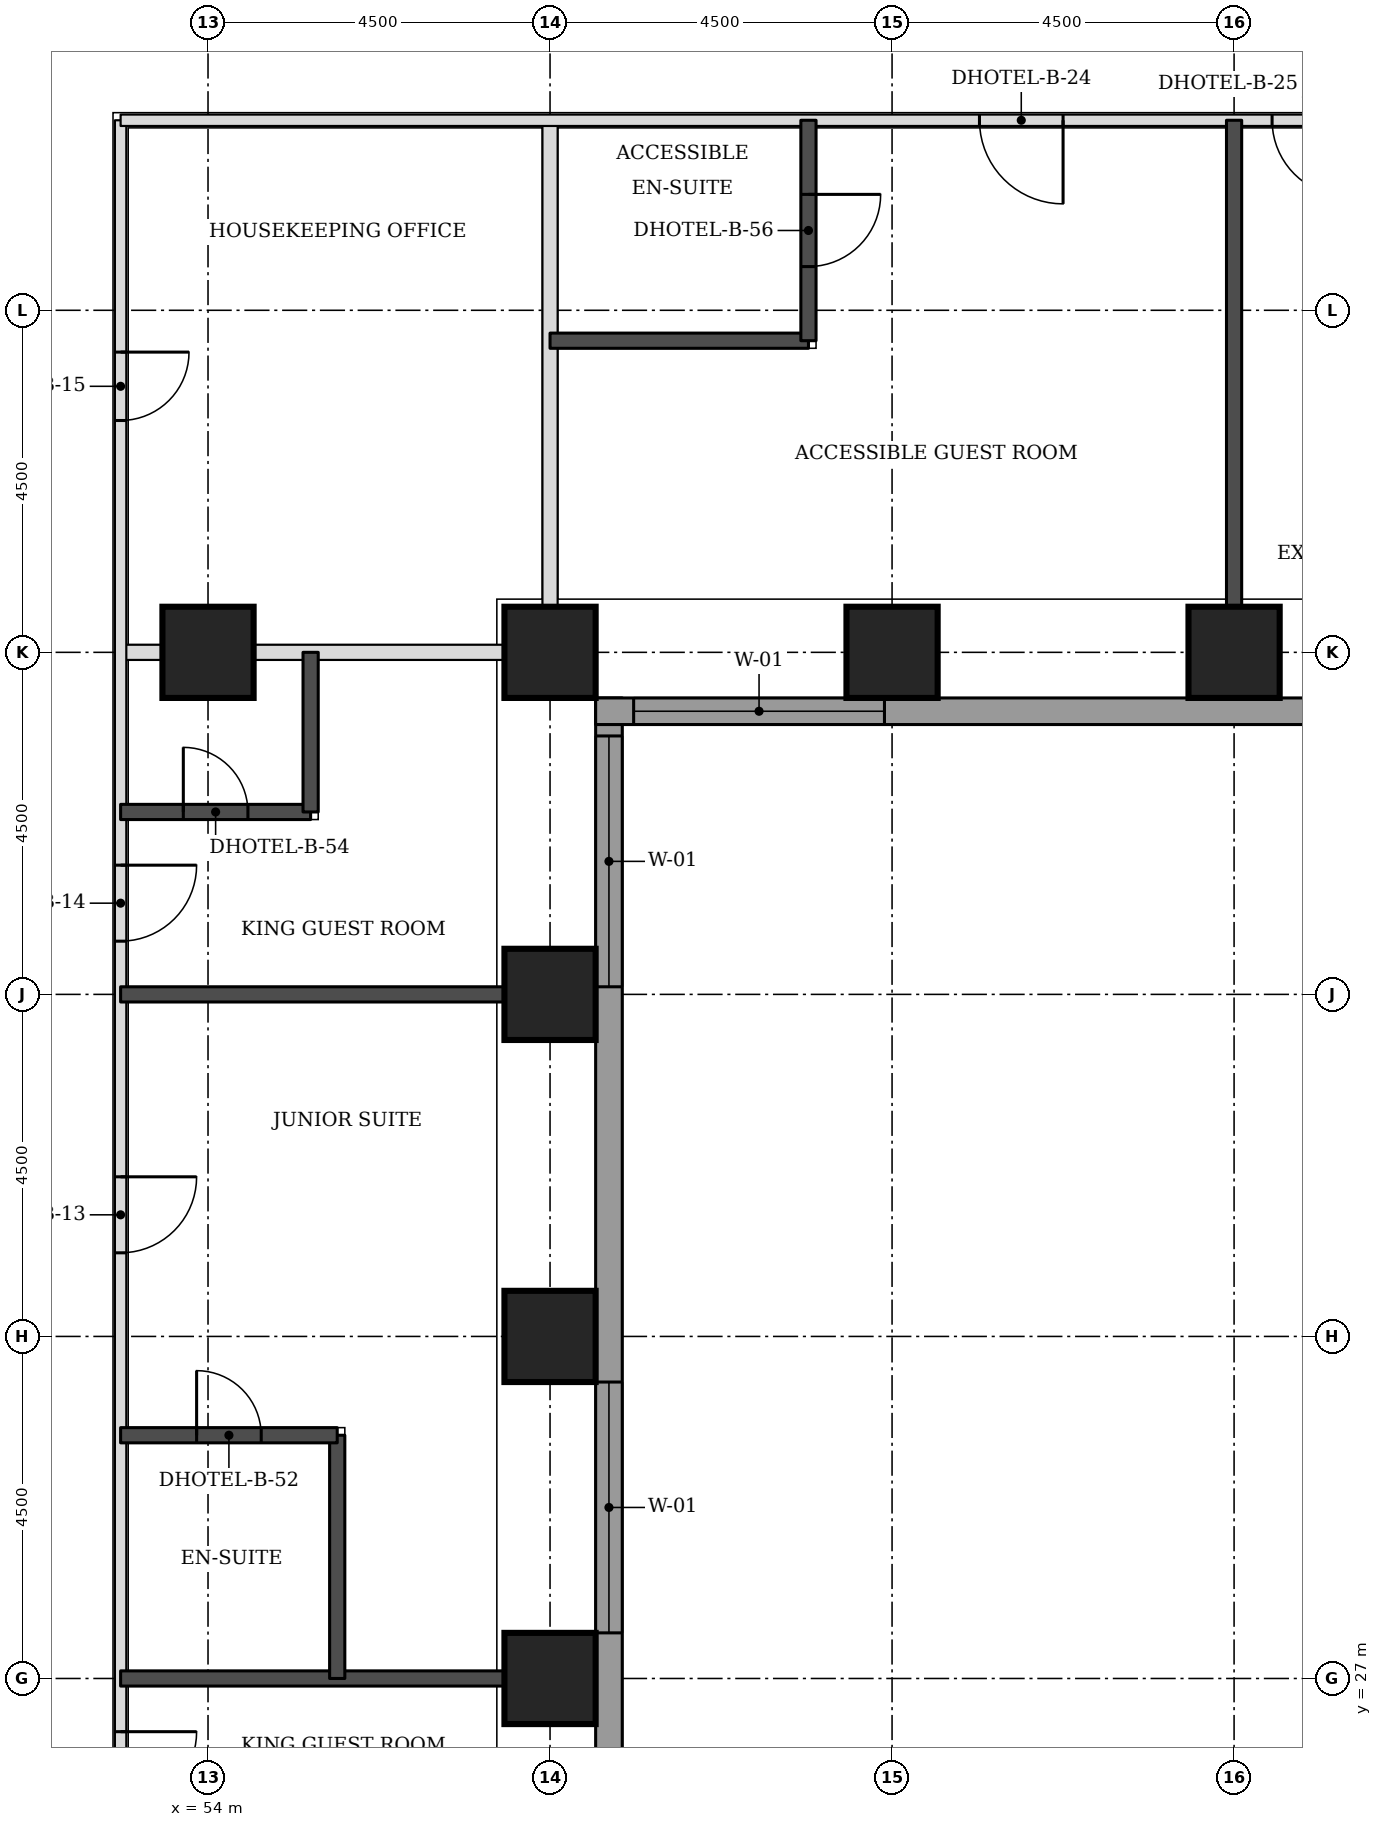
"""IFC4 building model, lengths in metres.
Left out: names, types, materials, properties, quantities, classifications, styles, units other than length and angle.
Written with IfcOpenShell. Run it as: python <this file> out.ifc"""

import sys

from ifc_helpers import new_model, si_unit, direction, frame, frame_2d, origin, origin_2d, place, context, subcontext, project, spatial, rectangle, extrude, element, fill, save


model = new_model("IFC4")
c1 = context("Model", 3, precision=1e-05, world=origin(), true_north=direction((0.0, 1.0)))
c2 = subcontext(c1, "Body", "Model", "MODEL_VIEW")
j1 = project(units=[si_unit("LENGTHUNIT", "METRE"), si_unit("PLANEANGLEUNIT", "RADIAN")], contexts=[c1])
p1 = place(None, origin())
s1 = spatial("IfcSite", under=j1, at=p1, CompositionType="ELEMENT")
p2 = place(p1, origin())
s2 = spatial("IfcBuilding", under=s1, at=p2, CompositionType="ELEMENT")
p3 = place(p2, frame((0.0, 0.0, 29.7)))
s3 = spatial("IfcBuildingStorey", under=s2, at=p3, CompositionType="ELEMENT", Elevation=29.7)
for number, where, z_axis, x_axis in (
    (1, (58.5, 27.0, 0.0), (0.0, 0.0, 1.0), (1.0, 0.0, 0.0)),
    (2, (58.5, 31.5, 0.0), (0.0, 0.0, 1.0), (1.0, 0.0, 0.0)),
    (3, (58.5, 36.0, 0.0), (0.0, 0.0, 1.0), (1.0, 0.0, 0.0)),
    (4, (54.0, 40.5, 0.0), (0.0, 0.0, 1.0), (1.0, 0.0, 0.0)),
    (5, (58.5, 40.5, 0.0), (0.0, 0.0, 1.0), (1.0, 0.0, 0.0)),
    (6, (63.0, 40.5, 0.0), (0.0, 0.0, 1.0), (1.0, 0.0, 0.0)),
    (7, (67.5, 40.5, 0.0), (0.0, 0.0, 1.0), (1.0, 0.0, 0.0)),
):
    element("IfcColumn", number, at=place(p3, frame(where, z_axis=z_axis, x_axis=x_axis)), inside=s3, PredefinedType="COLUMN", context=c2, shape_type="SweptSolid", body=[
        extrude(rectangle(XDim=1.2, YDim=1.2, at=origin_2d()), origin(), (0.0, 0.0, 1.0), 3.3),
    ])
p4 = place(p3, frame((59.275, 22.106, 0.0), z_axis=(0.0, 0.0, 1.0), x_axis=(0.0, 1.0, 0.0)))
e8 = element("IfcWall", 8, at=p4, inside=s3, PredefinedType="STANDARD", context=c2, shape_type="SweptSolid", body=[
    extrude(rectangle(XDim=17.793, YDim=0.35, at=frame_2d((8.897, 0.0))), origin(), (0.0, 0.0, 1.0), 3.055),
])
p5 = place(p4, frame((5.493, 0.0, 0.8)))
e9 = element("IfcOpeningElement", 9, at=p5, cuts=e8, PredefinedType="OPENING", context=c2, shape_type="SweptSolid", body=[
    extrude(rectangle(XDim=3.3, YDim=1.5, at=frame_2d((1.65, 0.75))), frame((0.0, 0.185, 0.0), z_axis=(0.0, -1.0, 0.0), x_axis=(1.0, 0.0, 0.0)), (0.0, 0.0, 1.0), 0.37),
])
p6 = place(p4, frame((13.993, 0.0, 0.8)))
e10 = element("IfcOpeningElement", 10, at=p6, cuts=e8, PredefinedType="OPENING", context=c2, shape_type="SweptSolid", body=[
    extrude(rectangle(XDim=3.3, YDim=1.5, at=frame_2d((1.65, 0.75))), frame((0.0, 0.185, 0.0), z_axis=(0.0, -1.0, 0.0), x_axis=(1.0, 0.0, 0.0)), (0.0, 0.0, 1.0), 0.37),
])
p7 = place(p3, frame((59.1, 39.725, 0.0), z_axis=(0.0, 0.0, 1.0), x_axis=(1.0, 0.0, 0.0)))
e11 = element("IfcWall", 11, at=p7, inside=s3, PredefinedType="STANDARD", context=c2, shape_type="SweptSolid", body=[
    extrude(rectangle(XDim=13.293, YDim=0.35, at=frame_2d((6.647, 0.0))), origin(), (0.0, 0.0, 1.0), 3.055),
])
p8 = place(p7, frame((0.5, 0.0, 0.8)))
e12 = element("IfcOpeningElement", 12, at=p8, cuts=e11, PredefinedType="OPENING", context=c2, shape_type="SweptSolid", body=[
    extrude(rectangle(XDim=3.3, YDim=1.5, at=frame_2d((1.65, 0.75))), frame((0.0, 0.185, 0.0), z_axis=(0.0, -1.0, 0.0), x_axis=(1.0, 0.0, 0.0)), (0.0, 0.0, 1.0), 0.37),
])
p9 = place(p3, frame((52.85, 40.5, 0.0), z_axis=(0.0, 0.0, 1.0), x_axis=(1.0, 0.0, 0.0)))
e13 = element("IfcWall", 13, at=p9, inside=s3, PredefinedType="PARTITIONING", context=c2, shape_type="SweptSolid", body=[
    extrude(rectangle(XDim=5.05, YDim=0.2, at=frame_2d((2.525, 0.0))), origin(), (0.0, 0.0, 1.0), 2.33),
])
p10 = place(p3, frame((58.5, 41.1, 0.0), z_axis=(0.0, 0.0, 1.0), x_axis=(0.0, 1.0, 0.0)))
e14 = element("IfcWall", 14, at=p10, inside=s3, PredefinedType="PARTITIONING", context=c2, shape_type="SweptSolid", body=[
    extrude(rectangle(XDim=6.4, YDim=0.2, at=frame_2d((3.2, 0.0))), origin(), (0.0, 0.0, 1.0), 3.08),
])
p11 = place(p3, frame((52.85, 23.65, 0.0), z_axis=(0.0, 0.0, 1.0), x_axis=(0.0, 1.0, 0.0)))
e15 = element("IfcWall", 15, at=p11, inside=s3, PredefinedType="PARTITIONING", context=c2, shape_type="SweptSolid", body=[
    extrude(rectangle(XDim=23.85, YDim=0.15, at=frame_2d((11.925, 0.0))), origin(), (0.0, 0.0, 1.0), 3.08),
])
p12 = place(p11, frame((1.65, 0.0, 0.0)))
e16 = element("IfcOpeningElement", 16, at=p12, cuts=e15, PredefinedType="OPENING", context=c2, shape_type="SweptSolid", body=[
    extrude(rectangle(XDim=1.0, YDim=2.1, at=frame_2d((0.5, 1.05))), frame((0.0, 0.085, 0.0), z_axis=(0.0, -1.0, 0.0), x_axis=(1.0, 0.0, 0.0)), (0.0, 0.0, 1.0), 0.17),
])
p13 = place(p11, frame((8.95, 0.0, 0.0)))
e17 = element("IfcOpeningElement", 17, at=p13, cuts=e15, PredefinedType="OPENING", context=c2, shape_type="SweptSolid", body=[
    extrude(rectangle(XDim=1.0, YDim=2.1, at=frame_2d((0.5, 1.05))), frame((0.0, 0.085, 0.0), z_axis=(0.0, -1.0, 0.0), x_axis=(1.0, 0.0, 0.0)), (0.0, 0.0, 1.0), 0.17),
])
p14 = place(p11, frame((13.05, 0.0, 0.0)))
e18 = element("IfcOpeningElement", 18, at=p14, cuts=e15, PredefinedType="OPENING", context=c2, shape_type="SweptSolid", body=[
    extrude(rectangle(XDim=1.0, YDim=2.1, at=frame_2d((0.5, 1.05))), frame((0.0, 0.085, 0.0), z_axis=(0.0, -1.0, 0.0), x_axis=(1.0, 0.0, 0.0)), (0.0, 0.0, 1.0), 0.17),
])
p15 = place(p11, frame((19.9, 0.0, 0.0)))
e19 = element("IfcOpeningElement", 19, at=p15, cuts=e15, PredefinedType="OPENING", context=c2, shape_type="SweptSolid", body=[
    extrude(rectangle(XDim=0.9, YDim=2.1, at=frame_2d((0.45, 1.05))), frame((0.0, 0.085, 0.0), z_axis=(0.0, -1.0, 0.0), x_axis=(1.0, 0.0, 0.0)), (0.0, 0.0, 1.0), 0.17),
])
p16 = place(p3, frame((52.85, 47.5, 0.0), z_axis=(0.0, 0.0, 1.0), x_axis=(1.0, 0.0, 0.0)))
e20 = element("IfcWall", 20, at=p16, inside=s3, PredefinedType="PARTITIONING", context=c2, shape_type="SweptSolid", body=[
    extrude(rectangle(XDim=16.65, YDim=0.15, at=frame_2d((8.325, 0.0))), origin(), (0.0, 0.0, 1.0), 3.08),
])
p17 = place(p16, frame((11.3, 0.0, 0.0)))
e21 = element("IfcOpeningElement", 21, at=p17, cuts=e20, PredefinedType="OPENING", context=c2, shape_type="SweptSolid", body=[
    extrude(rectangle(XDim=1.1, YDim=2.1, at=frame_2d((0.55, 1.05))), frame((0.0, 0.085, 0.0), z_axis=(0.0, -1.0, 0.0), x_axis=(1.0, 0.0, 0.0)), (0.0, 0.0, 1.0), 0.17),
])
p18 = place(p16, frame((15.15, 0.0, 0.0)))
e22 = element("IfcOpeningElement", 22, at=p18, cuts=e20, PredefinedType="OPENING", context=c2, shape_type="SweptSolid", body=[
    extrude(rectangle(XDim=1.0, YDim=2.1, at=frame_2d((0.5, 1.05))), frame((0.0, 0.085, 0.0), z_axis=(0.0, -1.0, 0.0), x_axis=(1.0, 0.0, 0.0)), (0.0, 0.0, 1.0), 0.17),
])
p19 = place(p3, frame((52.85, 27.0, 0.0), z_axis=(0.0, 0.0, 1.0), x_axis=(1.0, 0.0, 0.0)))
e23 = element("IfcWall", 23, at=p19, inside=s3, PredefinedType="SOLIDWALL", context=c2, shape_type="SweptSolid", body=[
    extrude(rectangle(XDim=5.05, YDim=0.2, at=frame_2d((2.525, 0.0))), origin(), (0.0, 0.0, 1.0), 3.08),
])
p20 = place(p3, frame((55.7, 27.0, 0.0), z_axis=(0.0, 0.0, 1.0), x_axis=(0.0, 1.0, 0.0)))
e24 = element("IfcWall", 24, at=p20, inside=s3, PredefinedType="SOLIDWALL", context=c2, shape_type="SweptSolid", body=[
    extrude(rectangle(XDim=3.2, YDim=0.2, at=frame_2d((1.6, 0.0))), origin(), (0.0, 0.0, 1.0), 3.08),
])
p21 = place(p3, frame((52.85, 30.2, 0.0), z_axis=(0.0, 0.0, 1.0), x_axis=(1.0, 0.0, 0.0)))
e25 = element("IfcWall", 25, at=p21, inside=s3, PredefinedType="SOLIDWALL", context=c2, shape_type="SweptSolid", body=[
    extrude(rectangle(XDim=2.85, YDim=0.2, at=frame_2d((1.425, 0.0))), origin(), (0.0, 0.0, 1.0), 3.08),
])
p22 = place(p21, frame((1.0, 0.0, 0.0)))
e26 = element("IfcOpeningElement", 26, at=p22, cuts=e25, PredefinedType="OPENING", context=c2, shape_type="SweptSolid", body=[
    extrude(rectangle(XDim=0.85, YDim=2.1, at=frame_2d((0.425, 1.05))), frame((0.0, 0.11, 0.0), z_axis=(0.0, -1.0, 0.0), x_axis=(1.0, 0.0, 0.0)), (0.0, 0.0, 1.0), 0.22),
])
p23 = place(p3, frame((52.85, 36.0, 0.0), z_axis=(0.0, 0.0, 1.0), x_axis=(1.0, 0.0, 0.0)))
e27 = element("IfcWall", 27, at=p23, inside=s3, PredefinedType="SOLIDWALL", context=c2, shape_type="SweptSolid", body=[
    extrude(rectangle(XDim=5.05, YDim=0.2, at=frame_2d((2.525, 0.0))), origin(), (0.0, 0.0, 1.0), 3.08),
])
p24 = place(p3, frame((52.85, 38.4, 0.0), z_axis=(0.0, 0.0, 1.0), x_axis=(1.0, 0.0, 0.0)))
e28 = element("IfcWall", 28, at=p24, inside=s3, PredefinedType="SOLIDWALL", context=c2, shape_type="SweptSolid", body=[
    extrude(rectangle(XDim=2.5, YDim=0.2, at=frame_2d((1.25, 0.0))), origin(), (0.0, 0.0, 1.0), 3.08),
])
p25 = place(p24, frame((0.825, 0.0, 0.0)))
e29 = element("IfcOpeningElement", 29, at=p25, cuts=e28, PredefinedType="OPENING", context=c2, shape_type="SweptSolid", body=[
    extrude(rectangle(XDim=0.85, YDim=2.1, at=frame_2d((0.425, 1.05))), frame((0.0, 0.11, 0.0), z_axis=(0.0, -1.0, 0.0), x_axis=(1.0, 0.0, 0.0)), (0.0, 0.0, 1.0), 0.22),
])
p26 = place(p3, frame((55.35, 38.4, 0.0), z_axis=(0.0, 0.0, 1.0), x_axis=(0.0, 1.0, 0.0)))
e30 = element("IfcWall", 30, at=p26, inside=s3, PredefinedType="SOLIDWALL", context=c2, shape_type="SweptSolid", body=[
    extrude(rectangle(XDim=2.1, YDim=0.2, at=frame_2d((1.05, 0.0))), origin(), (0.0, 0.0, 1.0), 3.08),
])
p27 = place(p3, frame((67.5, 41.1, 0.0), z_axis=(0.0, 0.0, 1.0), x_axis=(0.0, 1.0, 0.0)))
e31 = element("IfcWall", 31, at=p27, inside=s3, PredefinedType="SOLIDWALL", context=c2, shape_type="SweptSolid", body=[
    extrude(rectangle(XDim=6.4, YDim=0.2, at=frame_2d((3.2, 0.0))), origin(), (0.0, 0.0, 1.0), 3.08),
])
p28 = place(p3, frame((58.5, 44.6, 0.0), z_axis=(0.0, 0.0, 1.0), x_axis=(1.0, 0.0, 0.0)))
e32 = element("IfcWall", 32, at=p28, inside=s3, PredefinedType="SOLIDWALL", context=c2, shape_type="SweptSolid", body=[
    extrude(rectangle(XDim=3.4, YDim=0.2, at=frame_2d((1.7, 0.0))), origin(), (0.0, 0.0, 1.0), 3.08),
])
p29 = place(p3, frame((61.9, 44.6, 0.0), z_axis=(0.0, 0.0, 1.0), x_axis=(0.0, 1.0, 0.0)))
e33 = element("IfcWall", 33, at=p29, inside=s3, PredefinedType="SOLIDWALL", context=c2, shape_type="SweptSolid", body=[
    extrude(rectangle(XDim=2.9, YDim=0.2, at=frame_2d((1.45, 0.0))), origin(), (0.0, 0.0, 1.0), 3.08),
])
p30 = place(p29, frame((0.975, 0.0, 0.0)))
e34 = element("IfcOpeningElement", 34, at=p30, cuts=e33, PredefinedType="OPENING", context=c2, shape_type="SweptSolid", body=[
    extrude(rectangle(XDim=0.95, YDim=2.1, at=frame_2d((0.475, 1.05))), frame((0.0, 0.11, 0.0), z_axis=(0.0, -1.0, 0.0), x_axis=(1.0, 0.0, 0.0)), (0.0, 0.0, 1.0), 0.22),
])
p31 = place(p5, origin())
e35 = element("IfcWindow", 35, at=p31, inside=s3, PartitioningType="SINGLE_PANEL", PredefinedType="WINDOW", context=c2, shape_type="SweptSolid", body=[
    extrude(rectangle(XDim=3.3, YDim=1.5, at=frame_2d((1.65, 0.75))), frame((0.0, 0.085, 0.0), z_axis=(0.0, -1.0, 0.0), x_axis=(1.0, 0.0, 0.0)), (0.0, 0.0, 1.0), 0.06),
])
fill(e9, e35)
p32 = place(p6, origin())
e36 = element("IfcWindow", 36, at=p32, inside=s3, PartitioningType="SINGLE_PANEL", PredefinedType="WINDOW", context=c2, shape_type="SweptSolid", body=[
    extrude(rectangle(XDim=3.3, YDim=1.5, at=frame_2d((1.65, 0.75))), frame((0.0, 0.085, 0.0), z_axis=(0.0, -1.0, 0.0), x_axis=(1.0, 0.0, 0.0)), (0.0, 0.0, 1.0), 0.06),
])
fill(e10, e36)
p33 = place(p8, origin())
e37 = element("IfcWindow", 37, at=p33, inside=s3, PartitioningType="SINGLE_PANEL", PredefinedType="WINDOW", context=c2, shape_type="SweptSolid", body=[
    extrude(rectangle(XDim=3.3, YDim=1.5, at=frame_2d((1.65, 0.75))), frame((0.0, 0.085, 0.0), z_axis=(0.0, -1.0, 0.0), x_axis=(1.0, 0.0, 0.0)), (0.0, 0.0, 1.0), 0.06),
])
fill(e12, e37)
p34 = place(p12, frame((1.0, 0.0, 0.0), z_axis=(0.0, 0.0, 1.0), x_axis=(-1.0, 0.0, 0.0)))
e38 = element("IfcDoor", 38, at=p34, inside=s3, OperationType="SINGLE_SWING_LEFT", PredefinedType="DOOR", context=c2, shape_type="SweptSolid", body=[
    extrude(rectangle(XDim=1.0, YDim=2.1, at=frame_2d((0.5, 1.05))), frame((0.0, 0.025, 0.0), z_axis=(0.0, -1.0, 0.0), x_axis=(1.0, 0.0, 0.0)), (0.0, 0.0, 1.0), 0.05),
])
fill(e16, e38)
p35 = place(p13, frame((1.0, 0.0, 0.0), z_axis=(0.0, 0.0, 1.0), x_axis=(-1.0, 0.0, 0.0)))
e39 = element("IfcDoor", 39, at=p35, inside=s3, OperationType="SINGLE_SWING_LEFT", PredefinedType="DOOR", context=c2, shape_type="SweptSolid", body=[
    extrude(rectangle(XDim=1.0, YDim=2.1, at=frame_2d((0.5, 1.05))), frame((0.0, 0.025, 0.0), z_axis=(0.0, -1.0, 0.0), x_axis=(1.0, 0.0, 0.0)), (0.0, 0.0, 1.0), 0.05),
])
fill(e17, e39)
p36 = place(p22, origin())
e40 = element("IfcDoor", 40, at=p36, inside=s3, OperationType="SINGLE_SWING_LEFT", PredefinedType="DOOR", context=c2, shape_type="SweptSolid", body=[
    extrude(rectangle(XDim=0.85, YDim=2.1, at=frame_2d((0.425, 1.05))), frame((0.0, 0.025, 0.0), z_axis=(0.0, -1.0, 0.0), x_axis=(1.0, 0.0, 0.0)), (0.0, 0.0, 1.0), 0.05),
])
fill(e26, e40)
p37 = place(p14, frame((1.0, 0.0, 0.0), z_axis=(0.0, 0.0, 1.0), x_axis=(-1.0, 0.0, 0.0)))
e41 = element("IfcDoor", 41, at=p37, inside=s3, OperationType="SINGLE_SWING_LEFT", PredefinedType="DOOR", context=c2, shape_type="SweptSolid", body=[
    extrude(rectangle(XDim=1.0, YDim=2.1, at=frame_2d((0.5, 1.05))), frame((0.0, 0.025, 0.0), z_axis=(0.0, -1.0, 0.0), x_axis=(1.0, 0.0, 0.0)), (0.0, 0.0, 1.0), 0.05),
])
fill(e18, e41)
p38 = place(p25, origin())
e42 = element("IfcDoor", 42, at=p38, inside=s3, OperationType="SINGLE_SWING_LEFT", PredefinedType="DOOR", context=c2, shape_type="SweptSolid", body=[
    extrude(rectangle(XDim=0.85, YDim=2.1, at=frame_2d((0.425, 1.05))), frame((0.0, 0.025, 0.0), z_axis=(0.0, -1.0, 0.0), x_axis=(1.0, 0.0, 0.0)), (0.0, 0.0, 1.0), 0.05),
])
fill(e29, e42)
p39 = place(p17, frame((1.1, 0.0, 0.0), z_axis=(0.0, 0.0, 1.0), x_axis=(-1.0, 0.0, 0.0)))
e43 = element("IfcDoor", 43, at=p39, inside=s3, OperationType="SINGLE_SWING_LEFT", PredefinedType="DOOR", context=c2, shape_type="SweptSolid", body=[
    extrude(rectangle(XDim=1.1, YDim=2.1, at=frame_2d((0.55, 1.05))), frame((0.0, 0.025, 0.0), z_axis=(0.0, -1.0, 0.0), x_axis=(1.0, 0.0, 0.0)), (0.0, 0.0, 1.0), 0.05),
])
fill(e21, e43)
p40 = place(p30, frame((0.95, 0.0, 0.0), z_axis=(0.0, 0.0, 1.0), x_axis=(-1.0, 0.0, 0.0)))
e44 = element("IfcDoor", 44, at=p40, inside=s3, OperationType="SINGLE_SWING_LEFT", PredefinedType="DOOR", context=c2, shape_type="SweptSolid", body=[
    extrude(rectangle(XDim=0.95, YDim=2.1, at=frame_2d((0.475, 1.05))), frame((0.0, 0.025, 0.0), z_axis=(0.0, -1.0, 0.0), x_axis=(1.0, 0.0, 0.0)), (0.0, 0.0, 1.0), 0.05),
])
fill(e34, e44)
p41 = place(p18, frame((1.0, 0.0, 0.0), z_axis=(0.0, 0.0, 1.0), x_axis=(-1.0, 0.0, 0.0)))
e45 = element("IfcDoor", 45, at=p41, inside=s3, OperationType="SINGLE_SWING_LEFT", PredefinedType="DOOR", context=c2, shape_type="SweptSolid", body=[
    extrude(rectangle(XDim=1.0, YDim=2.1, at=frame_2d((0.5, 1.05))), frame((0.0, 0.025, 0.0), z_axis=(0.0, -1.0, 0.0), x_axis=(1.0, 0.0, 0.0)), (0.0, 0.0, 1.0), 0.05),
])
fill(e22, e45)
p42 = place(p15, frame((0.9, 0.0, 0.0), z_axis=(0.0, 0.0, 1.0), x_axis=(-1.0, 0.0, 0.0)))
e46 = element("IfcDoor", 46, at=p42, inside=s3, OperationType="SINGLE_SWING_LEFT", PredefinedType="DOOR", context=c2, shape_type="SweptSolid", body=[
    extrude(rectangle(XDim=0.9, YDim=2.1, at=frame_2d((0.45, 1.05))), frame((0.0, 0.025, 0.0), z_axis=(0.0, -1.0, 0.0), x_axis=(1.0, 0.0, 0.0)), (0.0, 0.0, 1.0), 0.05),
])
fill(e19, e46)
save(model, sys.argv[1])
